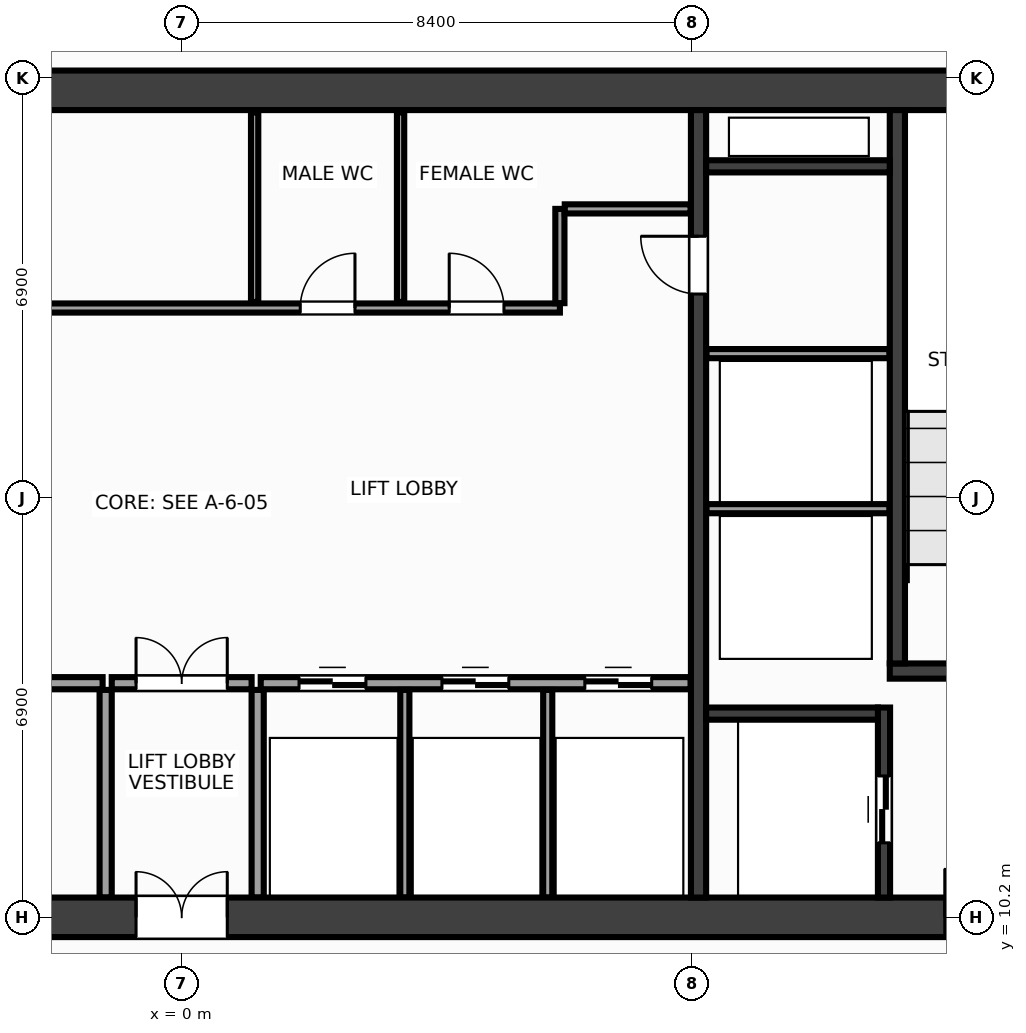
"""IFC4 building model, lengths in metres.
Left out: names, types, materials, properties, quantities, classifications, styles, units other than length and angle.
Written with IfcOpenShell. Run it as: python <this file> out.ifc"""

import sys

from ifc_helpers import new_model, si_unit, direction, frame, frame_2d, origin, place, context, subcontext, project, spatial, rectangle, extrude, source, transform, mapped, element, fill, save


model = new_model("IFC4")
c1 = context("Model", 3, precision=1e-05, world=origin(), true_north=direction((0.0, 1.0)))
c2 = subcontext(c1, "Body", "Model", "MODEL_VIEW")
j1 = project(units=[si_unit("LENGTHUNIT", "METRE"), si_unit("PLANEANGLEUNIT", "RADIAN")], contexts=[c1])
p1 = place(None, origin())
s1 = spatial("IfcSite", under=j1, at=p1, CompositionType="ELEMENT")
p2 = place(p1, origin())
s2 = spatial("IfcBuilding", under=s1, at=p2, CompositionType="ELEMENT")
p3 = place(p2, frame((0.0, 0.0, 174.8)))
s3 = spatial("IfcBuildingStorey", under=s2, at=p3, CompositionType="ELEMENT", Elevation=174.8)
m1 = source(origin(), c2, "Body", "SweptSolid", [
    extrude(rectangle(XDim=31.85, YDim=0.65, at=frame_2d((15.925, 0.0))), origin(), (0.0, 0.0, 1.0), 3.6),
])
p4 = place(p3, frame((-15.925, 23.8, 0.0), z_axis=(0.0, 0.0, 1.0), x_axis=(1.0, 0.0, 0.0)))
e1 = element("IfcWall", 1, at=p4, inside=s3, PredefinedType="SHEAR", context=c2, shape_type="MappedRepresentation", body=[
    mapped(m1, transform((0.0, 0.0, 0.0), x_axis=(1.0, 0.0, 0.0), y_axis=(0.0, 1.0, 0.0), z_axis=(0.0, 0.0, 1.0), scale=1.0)),
])
p5 = place(p3, frame((-15.925, 10.2, 0.0), z_axis=(0.0, 0.0, 1.0), x_axis=(1.0, 0.0, 0.0)))
e2 = element("IfcWall", 2, at=p5, inside=s3, PredefinedType="SHEAR", context=c2, shape_type="MappedRepresentation", body=[
    mapped(m1, transform((0.0, 0.0, 0.0), x_axis=(1.0, 0.0, 0.0), y_axis=(0.0, 1.0, 0.0), z_axis=(0.0, 0.0, 1.0), scale=1.0)),
])
p6 = place(p5, frame((1.775, 0.0, 0.0)))
e3 = element("IfcOpeningElement", 3, at=p6, cuts=e2, PredefinedType="OPENING", context=c2, shape_type="SweptSolid", body=[
    extrude(rectangle(XDim=1.6, YDim=2.15, at=frame_2d((0.8, 1.075))), frame((0.0, 0.337, 0.0), z_axis=(0.0, -1.0, 0.0), x_axis=(1.0, 0.0, 0.0)), (0.0, 0.0, 1.0), 0.674),
])
p7 = place(p5, frame((28.475, 0.0, 0.0)))
e4 = element("IfcOpeningElement", 4, at=p7, cuts=e2, PredefinedType="OPENING", context=c2, shape_type="SweptSolid", body=[
    extrude(rectangle(XDim=1.6, YDim=2.15, at=frame_2d((0.8, 1.075))), frame((0.0, 0.337, 0.0), z_axis=(0.0, -1.0, 0.0), x_axis=(1.0, 0.0, 0.0)), (0.0, 0.0, 1.0), 0.674),
])
p8 = place(p5, frame((15.175, 0.0, 0.0)))
e5 = element("IfcOpeningElement", 5, at=p8, cuts=e2, PredefinedType="OPENING", context=c2, shape_type="SweptSolid", body=[
    extrude(rectangle(XDim=1.5, YDim=2.2, at=frame_2d((0.75, 1.1))), frame((0.0, 0.337, 0.0), z_axis=(0.0, -1.0, 0.0), x_axis=(1.0, 0.0, 0.0)), (0.0, 0.0, 1.0), 0.674),
])
m2 = source(origin(), c2, "Body", "SweptSolid", [
    extrude(rectangle(XDim=12.95, YDim=0.25, at=frame_2d((6.475, 0.0))), origin(), (0.0, 0.0, 1.0), 3.6),
])
p9 = place(p3, frame((8.5, 10.525, 0.0), z_axis=(0.0, 0.0, 1.0), x_axis=(0.0, 1.0, 0.0)))
e6 = element("IfcWall", 6, at=p9, inside=s3, PredefinedType="SHEAR", context=c2, shape_type="MappedRepresentation", body=[
    mapped(m2, transform((0.0, 0.0, 0.0), x_axis=(1.0, 0.0, 0.0), y_axis=(0.0, 1.0, 0.0), z_axis=(0.0, 0.0, 1.0), scale=1.0)),
])
p10 = place(p9, frame((9.925, 0.0, 0.0)))
e7 = element("IfcOpeningElement", 7, at=p10, cuts=e6, PredefinedType="OPENING", context=c2, shape_type="SweptSolid", body=[
    extrude(rectangle(XDim=0.95, YDim=2.15, at=frame_2d((0.475, 1.075))), frame((0.0, 0.137, 0.0), z_axis=(0.0, -1.0, 0.0), x_axis=(1.0, 0.0, 0.0)), (0.0, 0.0, 1.0), 0.274),
])
m3 = source(origin(), c2, "Body", "SweptSolid", [
    extrude(rectangle(XDim=3.63, YDim=0.25, at=frame_2d((1.815, 0.0))), origin(), (0.0, 0.0, 1.0), 3.6),
])
p11 = place(p3, frame((11.645, 14.25, 0.0), z_axis=(0.0, 0.0, 1.0), x_axis=(1.0, 0.0, 0.0)))
e8 = element("IfcWall", 8, at=p11, inside=s3, PredefinedType="SHEAR", context=c2, shape_type="MappedRepresentation", body=[
    mapped(m3, transform((0.0, 0.0, 0.0), x_axis=(1.0, 0.0, 0.0), y_axis=(0.0, 1.0, 0.0), z_axis=(0.0, 0.0, 1.0), scale=1.0)),
])
p12 = place(p11, frame((0.95, 0.0, 0.0)))
e9 = element("IfcOpeningElement", 9, at=p12, cuts=e8, PredefinedType="OPENING", context=c2, shape_type="SweptSolid", body=[
    extrude(rectangle(XDim=1.6, YDim=2.15, at=frame_2d((0.8, 1.075))), frame((0.0, 0.137, 0.0), z_axis=(0.0, -1.0, 0.0), x_axis=(1.0, 0.0, 0.0)), (0.0, 0.0, 1.0), 0.274),
])
m4 = source(origin(), c2, "Body", "SweptSolid", [
    extrude(rectangle(XDim=9.1, YDim=0.25, at=frame_2d((4.55, 0.0))), origin(), (0.0, 0.0, 1.0), 3.6),
])
p13 = place(p3, frame((11.77, 14.375, 0.0), z_axis=(0.0, 0.0, 1.0), x_axis=(0.0, 1.0, 0.0)))
e10 = element("IfcWall", 10, at=p13, inside=s3, PredefinedType="SHEAR", context=c2, shape_type="MappedRepresentation", body=[
    mapped(m4, transform((0.0, 0.0, 0.0), x_axis=(1.0, 0.0, 0.0), y_axis=(0.0, 1.0, 0.0), z_axis=(0.0, 0.0, 1.0), scale=1.0)),
])
m5 = source(origin(), c2, "Body", "SweptSolid", [
    extrude(rectangle(XDim=3.125, YDim=0.2, at=frame_2d((1.562, 0.0))), origin(), (0.0, 0.0, 1.0), 3.6),
])
p14 = place(p3, frame((11.55, 10.525, 0.0), z_axis=(0.0, 0.0, 1.0), x_axis=(0.0, 1.0, 0.0)))
e11 = element("IfcWall", 11, at=p14, inside=s3, PredefinedType="SHEAR", context=c2, shape_type="MappedRepresentation", body=[
    mapped(m5, transform((0.0, 0.0, 0.0), x_axis=(1.0, 0.0, 0.0), y_axis=(0.0, 1.0, 0.0), z_axis=(0.0, 0.0, 1.0), scale=1.0)),
])
p15 = place(p14, frame((0.9, 0.0, 0.0)))
e12 = element("IfcOpeningElement", 12, at=p15, cuts=e11, PredefinedType="OPENING", context=c2, shape_type="SweptSolid", body=[
    extrude(rectangle(XDim=1.1, YDim=2.15, at=frame_2d((0.55, 1.075))), frame((0.0, 0.112, 0.0), z_axis=(0.0, -1.0, 0.0), x_axis=(1.0, 0.0, 0.0)), (0.0, 0.0, 1.0), 0.224),
])
m6 = source(origin(), c2, "Body", "SweptSolid", [
    extrude(rectangle(XDim=2.825, YDim=0.2, at=frame_2d((1.413, 0.0))), origin(), (0.0, 0.0, 1.0), 3.6),
])
p16 = place(p3, frame((8.625, 13.55, 0.0), z_axis=(0.0, 0.0, 1.0), x_axis=(1.0, 0.0, 0.0)))
e13 = element("IfcWall", 13, at=p16, inside=s3, PredefinedType="SHEAR", context=c2, shape_type="MappedRepresentation", body=[
    mapped(m6, transform((0.0, 0.0, 0.0), x_axis=(1.0, 0.0, 0.0), y_axis=(0.0, 1.0, 0.0), z_axis=(0.0, 0.0, 1.0), scale=1.0)),
])
m7 = source(origin(), c2, "Body", "SweptSolid", [
    extrude(rectangle(XDim=3.02, YDim=0.2, at=frame_2d((1.51, 0.0))), origin(), (0.0, 0.0, 1.0), 3.6),
])
p17 = place(p3, frame((8.625, 22.55, 0.0), z_axis=(0.0, 0.0, 1.0), x_axis=(1.0, 0.0, 0.0)))
e14 = element("IfcWall", 14, at=p17, inside=s3, PredefinedType="SHEAR", context=c2, shape_type="MappedRepresentation", body=[
    mapped(m7, transform((0.0, 0.0, 0.0), x_axis=(1.0, 0.0, 0.0), y_axis=(0.0, 1.0, 0.0), z_axis=(0.0, 0.0, 1.0), scale=1.0)),
])
m8 = source(origin(), c2, "Body", "SweptSolid", [
    extrude(rectangle(XDim=3.01, YDim=0.15, at=frame_2d((1.505, 0.0))), origin(), (0.0, 0.0, 1.0), 3.38),
])
for number, where, z_axis, x_axis in (
    (15, (8.63, 16.92, 0.0), (0.0, 0.0, 1.0), (1.0, 0.0, 0.0)),
    (16, (8.63, 19.47, 0.0), (0.0, 0.0, 1.0), (1.0, 0.0, 0.0)),
):
    element("IfcWall", number, at=place(p3, frame(where, z_axis=z_axis, x_axis=x_axis)), inside=s3, PredefinedType="PARTITIONING", context=c2, shape_type="MappedRepresentation", body=[
        mapped(m8, transform((0.0, 0.0, 0.0), x_axis=(1.0, 0.0, 0.0), y_axis=(0.0, 1.0, 0.0), z_axis=(0.0, 0.0, 1.0), scale=1.0)),
    ])
m9 = source(origin(), c2, "Body", "SweptSolid", [
    extrude(rectangle(XDim=7.07, YDim=0.2, at=frame_2d((3.535, 0.0))), origin(), (0.0, 0.0, 1.0), 3.38),
])
p18 = place(p3, frame((-8.37, 14.05, 0.0), z_axis=(0.0, 0.0, 1.0), x_axis=(1.0, 0.0, 0.0)))
e17 = element("IfcWall", 17, at=p18, inside=s3, PredefinedType="PARTITIONING", context=c2, shape_type="MappedRepresentation", body=[
    mapped(m9, transform((0.0, 0.0, 0.0), x_axis=(1.0, 0.0, 0.0), y_axis=(0.0, 1.0, 0.0), z_axis=(0.0, 0.0, 1.0), scale=1.0)),
])
p19 = place(p18, frame((2.8, 0.0, 0.0)))
e18 = element("IfcOpeningElement", 18, at=p19, cuts=e17, PredefinedType="OPENING", context=c2, shape_type="SweptSolid", body=[
    extrude(rectangle(XDim=0.98, YDim=2.15, at=frame_2d((0.49, 1.075))), frame((0.0, 0.112, 0.0), z_axis=(0.0, -1.0, 0.0), x_axis=(1.0, 0.0, 0.0)), (0.0, 0.0, 1.0), 0.224),
])
p20 = place(p3, frame((1.3, 14.05, 0.0), z_axis=(0.0, 0.0, 1.0), x_axis=(1.0, 0.0, 0.0)))
e19 = element("IfcWall", 19, at=p20, inside=s3, PredefinedType="PARTITIONING", context=c2, shape_type="MappedRepresentation", body=[
    mapped(m9, transform((0.0, 0.0, 0.0), x_axis=(1.0, 0.0, 0.0), y_axis=(0.0, 1.0, 0.0), z_axis=(0.0, 0.0, 1.0), scale=1.0)),
])
p21 = place(p20, frame((0.63, 0.0, 0.0)))
e20 = element("IfcOpeningElement", 20, at=p21, cuts=e19, PredefinedType="OPENING", context=c2, shape_type="SweptSolid", body=[
    extrude(rectangle(XDim=1.1, YDim=2.15, at=frame_2d((0.55, 1.075))), frame((0.0, 0.112, 0.0), z_axis=(0.0, -1.0, 0.0), x_axis=(1.0, 0.0, 0.0)), (0.0, 0.0, 1.0), 0.224),
])
p22 = place(p20, frame((2.98, 0.0, 0.0)))
e21 = element("IfcOpeningElement", 21, at=p22, cuts=e19, PredefinedType="OPENING", context=c2, shape_type="SweptSolid", body=[
    extrude(rectangle(XDim=1.1, YDim=2.15, at=frame_2d((0.55, 1.075))), frame((0.0, 0.112, 0.0), z_axis=(0.0, -1.0, 0.0), x_axis=(1.0, 0.0, 0.0)), (0.0, 0.0, 1.0), 0.224),
])
p23 = place(p20, frame((5.33, 0.0, 0.0)))
e22 = element("IfcOpeningElement", 22, at=p23, cuts=e19, PredefinedType="OPENING", context=c2, shape_type="SweptSolid", body=[
    extrude(rectangle(XDim=1.1, YDim=2.15, at=frame_2d((0.55, 1.075))), frame((0.0, 0.112, 0.0), z_axis=(0.0, -1.0, 0.0), x_axis=(1.0, 0.0, 0.0)), (0.0, 0.0, 1.0), 0.224),
])
m10 = source(origin(), c2, "Body", "SweptSolid", [
    extrude(rectangle(XDim=3.415, YDim=0.2, at=frame_2d((1.708, 0.0))), origin(), (0.0, 0.0, 1.0), 3.38),
])
for number, where, z_axis, x_axis in (
    (23, (-1.25, 10.525, 0.0), (0.0, 0.0, 1.0), (0.0, 1.0, 0.0)),
    (24, (1.25, 10.525, 0.0), (0.0, 0.0, 1.0), (0.0, 1.0, 0.0)),
):
    element("IfcWall", number, at=place(p3, frame(where, z_axis=z_axis, x_axis=x_axis)), inside=s3, PredefinedType="PARTITIONING", context=c2, shape_type="MappedRepresentation", body=[
        mapped(m10, transform((0.0, 0.0, 0.0), x_axis=(1.0, 0.0, 0.0), y_axis=(0.0, 1.0, 0.0), z_axis=(0.0, 0.0, 1.0), scale=1.0)),
    ])
m11 = source(origin(), c2, "Body", "SweptSolid", [
    extrude(rectangle(XDim=2.3, YDim=0.2, at=frame_2d((1.15, 0.0))), origin(), (0.0, 0.0, 1.0), 3.38),
])
p24 = place(p3, frame((-1.15, 14.05, 0.0), z_axis=(0.0, 0.0, 1.0), x_axis=(1.0, 0.0, 0.0)))
e25 = element("IfcWall", 25, at=p24, inside=s3, PredefinedType="PARTITIONING", context=c2, shape_type="MappedRepresentation", body=[
    mapped(m11, transform((0.0, 0.0, 0.0), x_axis=(1.0, 0.0, 0.0), y_axis=(0.0, 1.0, 0.0), z_axis=(0.0, 0.0, 1.0), scale=1.0)),
])
p25 = place(p24, frame((0.4, 0.0, 0.0)))
e26 = element("IfcOpeningElement", 26, at=p25, cuts=e25, PredefinedType="OPENING", context=c2, shape_type="SweptSolid", body=[
    extrude(rectangle(XDim=1.5, YDim=2.2, at=frame_2d((0.75, 1.1))), frame((0.0, 0.112, 0.0), z_axis=(0.0, -1.0, 0.0), x_axis=(1.0, 0.0, 0.0)), (0.0, 0.0, 1.0), 0.224),
])
m12 = source(origin(), c2, "Body", "SweptSolid", [
    extrude(rectangle(XDim=14.59, YDim=0.15, at=frame_2d((7.295, 0.0))), origin(), (0.0, 0.0, 1.0), 3.38),
])
p26 = place(p3, frame((-8.37, 20.22, 0.0), z_axis=(0.0, 0.0, 1.0), x_axis=(1.0, 0.0, 0.0)))
e27 = element("IfcWall", 27, at=p26, inside=s3, PredefinedType="PARTITIONING", context=c2, shape_type="MappedRepresentation", body=[
    mapped(m12, transform((0.0, 0.0, 0.0), x_axis=(1.0, 0.0, 0.0), y_axis=(0.0, 1.0, 0.0), z_axis=(0.0, 0.0, 1.0), scale=1.0)),
])
p27 = place(p26, frame((4.36, 0.0, 0.0)))
e28 = element("IfcOpeningElement", 28, at=p27, cuts=e27, PredefinedType="OPENING", context=c2, shape_type="SweptSolid", body=[
    extrude(rectangle(XDim=0.9, YDim=2.15, at=frame_2d((0.45, 1.075))), frame((0.0, 0.087, 0.0), z_axis=(0.0, -1.0, 0.0), x_axis=(1.0, 0.0, 0.0)), (0.0, 0.0, 1.0), 0.174),
])
p28 = place(p26, frame((10.32, 0.0, 0.0)))
e29 = element("IfcOpeningElement", 29, at=p28, cuts=e27, PredefinedType="OPENING", context=c2, shape_type="SweptSolid", body=[
    extrude(rectangle(XDim=0.9, YDim=2.15, at=frame_2d((0.45, 1.075))), frame((0.0, 0.087, 0.0), z_axis=(0.0, -1.0, 0.0), x_axis=(1.0, 0.0, 0.0)), (0.0, 0.0, 1.0), 0.174),
])
p29 = place(p26, frame((12.77, 0.0, 0.0)))
e30 = element("IfcOpeningElement", 30, at=p29, cuts=e27, PredefinedType="OPENING", context=c2, shape_type="SweptSolid", body=[
    extrude(rectangle(XDim=0.9, YDim=2.15, at=frame_2d((0.45, 1.075))), frame((0.0, 0.087, 0.0), z_axis=(0.0, -1.0, 0.0), x_axis=(1.0, 0.0, 0.0)), (0.0, 0.0, 1.0), 0.174),
])
m13 = source(origin(), c2, "Body", "SweptSolid", [
    extrude(rectangle(XDim=1.55, YDim=0.15, at=frame_2d((0.775, 0.0))), origin(), (0.0, 0.0, 1.0), 3.38),
])
p30 = place(p3, frame((6.22, 20.3, 0.0), z_axis=(0.0, 0.0, 1.0), x_axis=(0.0, 1.0, 0.0)))
e31 = element("IfcWall", 31, at=p30, inside=s3, PredefinedType="PARTITIONING", context=c2, shape_type="MappedRepresentation", body=[
    mapped(m13, transform((0.0, 0.0, 0.0), x_axis=(1.0, 0.0, 0.0), y_axis=(0.0, 1.0, 0.0), z_axis=(0.0, 0.0, 1.0), scale=1.0)),
])
m14 = source(origin(), c2, "Body", "SweptSolid", [
    extrude(rectangle(XDim=2.07, YDim=0.15, at=frame_2d((1.035, 0.0))), origin(), (0.0, 0.0, 1.0), 3.38),
])
p31 = place(p3, frame((6.3, 21.85, 0.0), z_axis=(0.0, 0.0, 1.0), x_axis=(1.0, 0.0, 0.0)))
e32 = element("IfcWall", 32, at=p31, inside=s3, PredefinedType="PARTITIONING", context=c2, shape_type="MappedRepresentation", body=[
    mapped(m14, transform((0.0, 0.0, 0.0), x_axis=(1.0, 0.0, 0.0), y_axis=(0.0, 1.0, 0.0), z_axis=(0.0, 0.0, 1.0), scale=1.0)),
])
m15 = source(origin(), c2, "Body", "SweptSolid", [
    extrude(rectangle(XDim=3.415, YDim=0.15, at=frame_2d((1.708, 0.0))), origin(), (0.0, 0.0, 1.0), 3.38),
])
for number, where, z_axis, x_axis in (
    (33, (3.67, 10.525, 0.0), (0.0, 0.0, 1.0), (0.0, 1.0, 0.0)),
    (34, (6.02, 10.525, 0.0), (0.0, 0.0, 1.0), (0.0, 1.0, 0.0)),
):
    element("IfcWall", number, at=place(p3, frame(where, z_axis=z_axis, x_axis=x_axis)), inside=s3, PredefinedType="PARTITIONING", context=c2, shape_type="MappedRepresentation", body=[
        mapped(m15, transform((0.0, 0.0, 0.0), x_axis=(1.0, 0.0, 0.0), y_axis=(0.0, 1.0, 0.0), z_axis=(0.0, 0.0, 1.0), scale=1.0)),
    ])
m16 = source(origin(), c2, "Body", "SweptSolid", [
    extrude(rectangle(XDim=3.115, YDim=0.12, at=frame_2d((1.558, 0.0))), origin(), (0.0, 0.0, 1.0), 3.38),
])
for number, where, z_axis, x_axis in (
    (35, (1.2, 20.32, 0.0), (0.0, 0.0, 1.0), (0.0, 1.0, 0.0)),
    (36, (3.6, 20.32, 0.0), (0.0, 0.0, 1.0), (0.0, 1.0, 0.0)),
):
    element("IfcWall", number, at=place(p3, frame(where, z_axis=z_axis, x_axis=x_axis)), inside=s3, PredefinedType="PARTITIONING", context=c2, shape_type="MappedRepresentation", body=[
        mapped(m16, transform((0.0, 0.0, 0.0), x_axis=(1.0, 0.0, 0.0), y_axis=(0.0, 1.0, 0.0), z_axis=(0.0, 0.0, 1.0), scale=1.0)),
    ])
m17 = source(origin(), c2, "Body", "SweptSolid", [
    extrude(rectangle(XDim=1.6, YDim=2.15, at=frame_2d((0.8, 1.075))), frame((0.0, 0.025, 0.0), z_axis=(0.0, -1.0, 0.0), x_axis=(1.0, 0.0, 0.0)), (0.0, 0.0, 1.0), 0.05),
])
p32 = place(p7, origin())
e37 = element("IfcDoor", 37, at=p32, inside=s3, OperationType="DOUBLE_DOOR_SINGLE_SWING", PredefinedType="DOOR", context=c2, shape_type="MappedRepresentation", body=[
    mapped(m17, transform((0.0, 0.0, 0.0), x_axis=(1.0, 0.0, 0.0), y_axis=(0.0, 1.0, 0.0), z_axis=(0.0, 0.0, 1.0), scale=1.0)),
])
fill(e4, e37)
m18 = source(origin(), c2, "Body", "SweptSolid", [
    extrude(rectangle(XDim=1.1, YDim=2.15, at=frame_2d((0.55, 1.075))), frame((0.0, 0.025, 0.0), z_axis=(0.0, -1.0, 0.0), x_axis=(1.0, 0.0, 0.0)), (0.0, 0.0, 1.0), 0.05),
])
p33 = place(p15, origin())
e38 = element("IfcDoor", 38, at=p33, inside=s3, OperationType="DOUBLE_DOOR_SLIDING", PredefinedType="DOOR", context=c2, shape_type="MappedRepresentation", body=[
    mapped(m18, transform((0.0, 0.0, 0.0), x_axis=(1.0, 0.0, 0.0), y_axis=(0.0, 1.0, 0.0), z_axis=(0.0, 0.0, 1.0), scale=1.0)),
])
fill(e12, e38)
m19 = source(origin(), c2, "Body", "SweptSolid", [
    extrude(rectangle(XDim=0.95, YDim=2.15, at=frame_2d((0.475, 1.075))), frame((0.0, 0.025, 0.0), z_axis=(0.0, -1.0, 0.0), x_axis=(1.0, 0.0, 0.0)), (0.0, 0.0, 1.0), 0.05),
])
p34 = place(p10, origin())
e39 = element("IfcDoor", 39, at=p34, inside=s3, OperationType="SINGLE_SWING_RIGHT", PredefinedType="DOOR", context=c2, shape_type="MappedRepresentation", body=[
    mapped(m19, transform((0.0, 0.0, 0.0), x_axis=(1.0, 0.0, 0.0), y_axis=(0.0, 1.0, 0.0), z_axis=(0.0, 0.0, 1.0), scale=1.0)),
])
fill(e7, e39)
p35 = place(p21, origin())
e40 = element("IfcDoor", 40, at=p35, inside=s3, OperationType="DOUBLE_DOOR_SLIDING", PredefinedType="DOOR", context=c2, shape_type="MappedRepresentation", body=[
    mapped(m18, transform((0.0, 0.0, 0.0), x_axis=(1.0, 0.0, 0.0), y_axis=(0.0, 1.0, 0.0), z_axis=(0.0, 0.0, 1.0), scale=1.0)),
])
fill(e20, e40)
p36 = place(p22, origin())
e41 = element("IfcDoor", 41, at=p36, inside=s3, OperationType="DOUBLE_DOOR_SLIDING", PredefinedType="DOOR", context=c2, shape_type="MappedRepresentation", body=[
    mapped(m18, transform((0.0, 0.0, 0.0), x_axis=(1.0, 0.0, 0.0), y_axis=(0.0, 1.0, 0.0), z_axis=(0.0, 0.0, 1.0), scale=1.0)),
])
fill(e21, e41)
p37 = place(p23, origin())
e42 = element("IfcDoor", 42, at=p37, inside=s3, OperationType="DOUBLE_DOOR_SLIDING", PredefinedType="DOOR", context=c2, shape_type="MappedRepresentation", body=[
    mapped(m18, transform((0.0, 0.0, 0.0), x_axis=(1.0, 0.0, 0.0), y_axis=(0.0, 1.0, 0.0), z_axis=(0.0, 0.0, 1.0), scale=1.0)),
])
fill(e22, e42)
m20 = source(origin(), c2, "Body", "SweptSolid", [
    extrude(rectangle(XDim=1.5, YDim=2.2, at=frame_2d((0.75, 1.1))), frame((0.0, 0.025, 0.0), z_axis=(0.0, -1.0, 0.0), x_axis=(1.0, 0.0, 0.0)), (0.0, 0.0, 1.0), 0.05),
])
p38 = place(p25, origin())
e43 = element("IfcDoor", 43, at=p38, inside=s3, OperationType="DOUBLE_DOOR_SINGLE_SWING", PredefinedType="DOOR", context=c2, shape_type="MappedRepresentation", body=[
    mapped(m20, transform((0.0, 0.0, 0.0), x_axis=(1.0, 0.0, 0.0), y_axis=(0.0, 1.0, 0.0), z_axis=(0.0, 0.0, 1.0), scale=1.0)),
])
fill(e26, e43)
p39 = place(p8, origin())
e44 = element("IfcDoor", 44, at=p39, inside=s3, OperationType="DOUBLE_DOOR_SINGLE_SWING", PredefinedType="DOOR", context=c2, shape_type="MappedRepresentation", body=[
    mapped(m20, transform((0.0, 0.0, 0.0), x_axis=(1.0, 0.0, 0.0), y_axis=(0.0, 1.0, 0.0), z_axis=(0.0, 0.0, 1.0), scale=1.0)),
])
fill(e5, e44)
m21 = source(origin(), c2, "Body", "SweptSolid", [
    extrude(rectangle(XDim=0.9, YDim=2.15, at=frame_2d((0.45, 1.075))), frame((0.0, 0.025, 0.0), z_axis=(0.0, -1.0, 0.0), x_axis=(1.0, 0.0, 0.0)), (0.0, 0.0, 1.0), 0.05),
])
p40 = place(p28, origin())
e45 = element("IfcDoor", 45, at=p40, inside=s3, OperationType="SINGLE_SWING_RIGHT", PredefinedType="DOOR", context=c2, shape_type="MappedRepresentation", body=[
    mapped(m21, transform((0.0, 0.0, 0.0), x_axis=(1.0, 0.0, 0.0), y_axis=(0.0, 1.0, 0.0), z_axis=(0.0, 0.0, 1.0), scale=1.0)),
])
fill(e29, e45)
p41 = place(p29, origin())
e46 = element("IfcDoor", 46, at=p41, inside=s3, OperationType="SINGLE_SWING_LEFT", PredefinedType="DOOR", context=c2, shape_type="MappedRepresentation", body=[
    mapped(m21, transform((0.0, 0.0, 0.0), x_axis=(1.0, 0.0, 0.0), y_axis=(0.0, 1.0, 0.0), z_axis=(0.0, 0.0, 1.0), scale=1.0)),
])
fill(e30, e46)
save(model, sys.argv[1])
